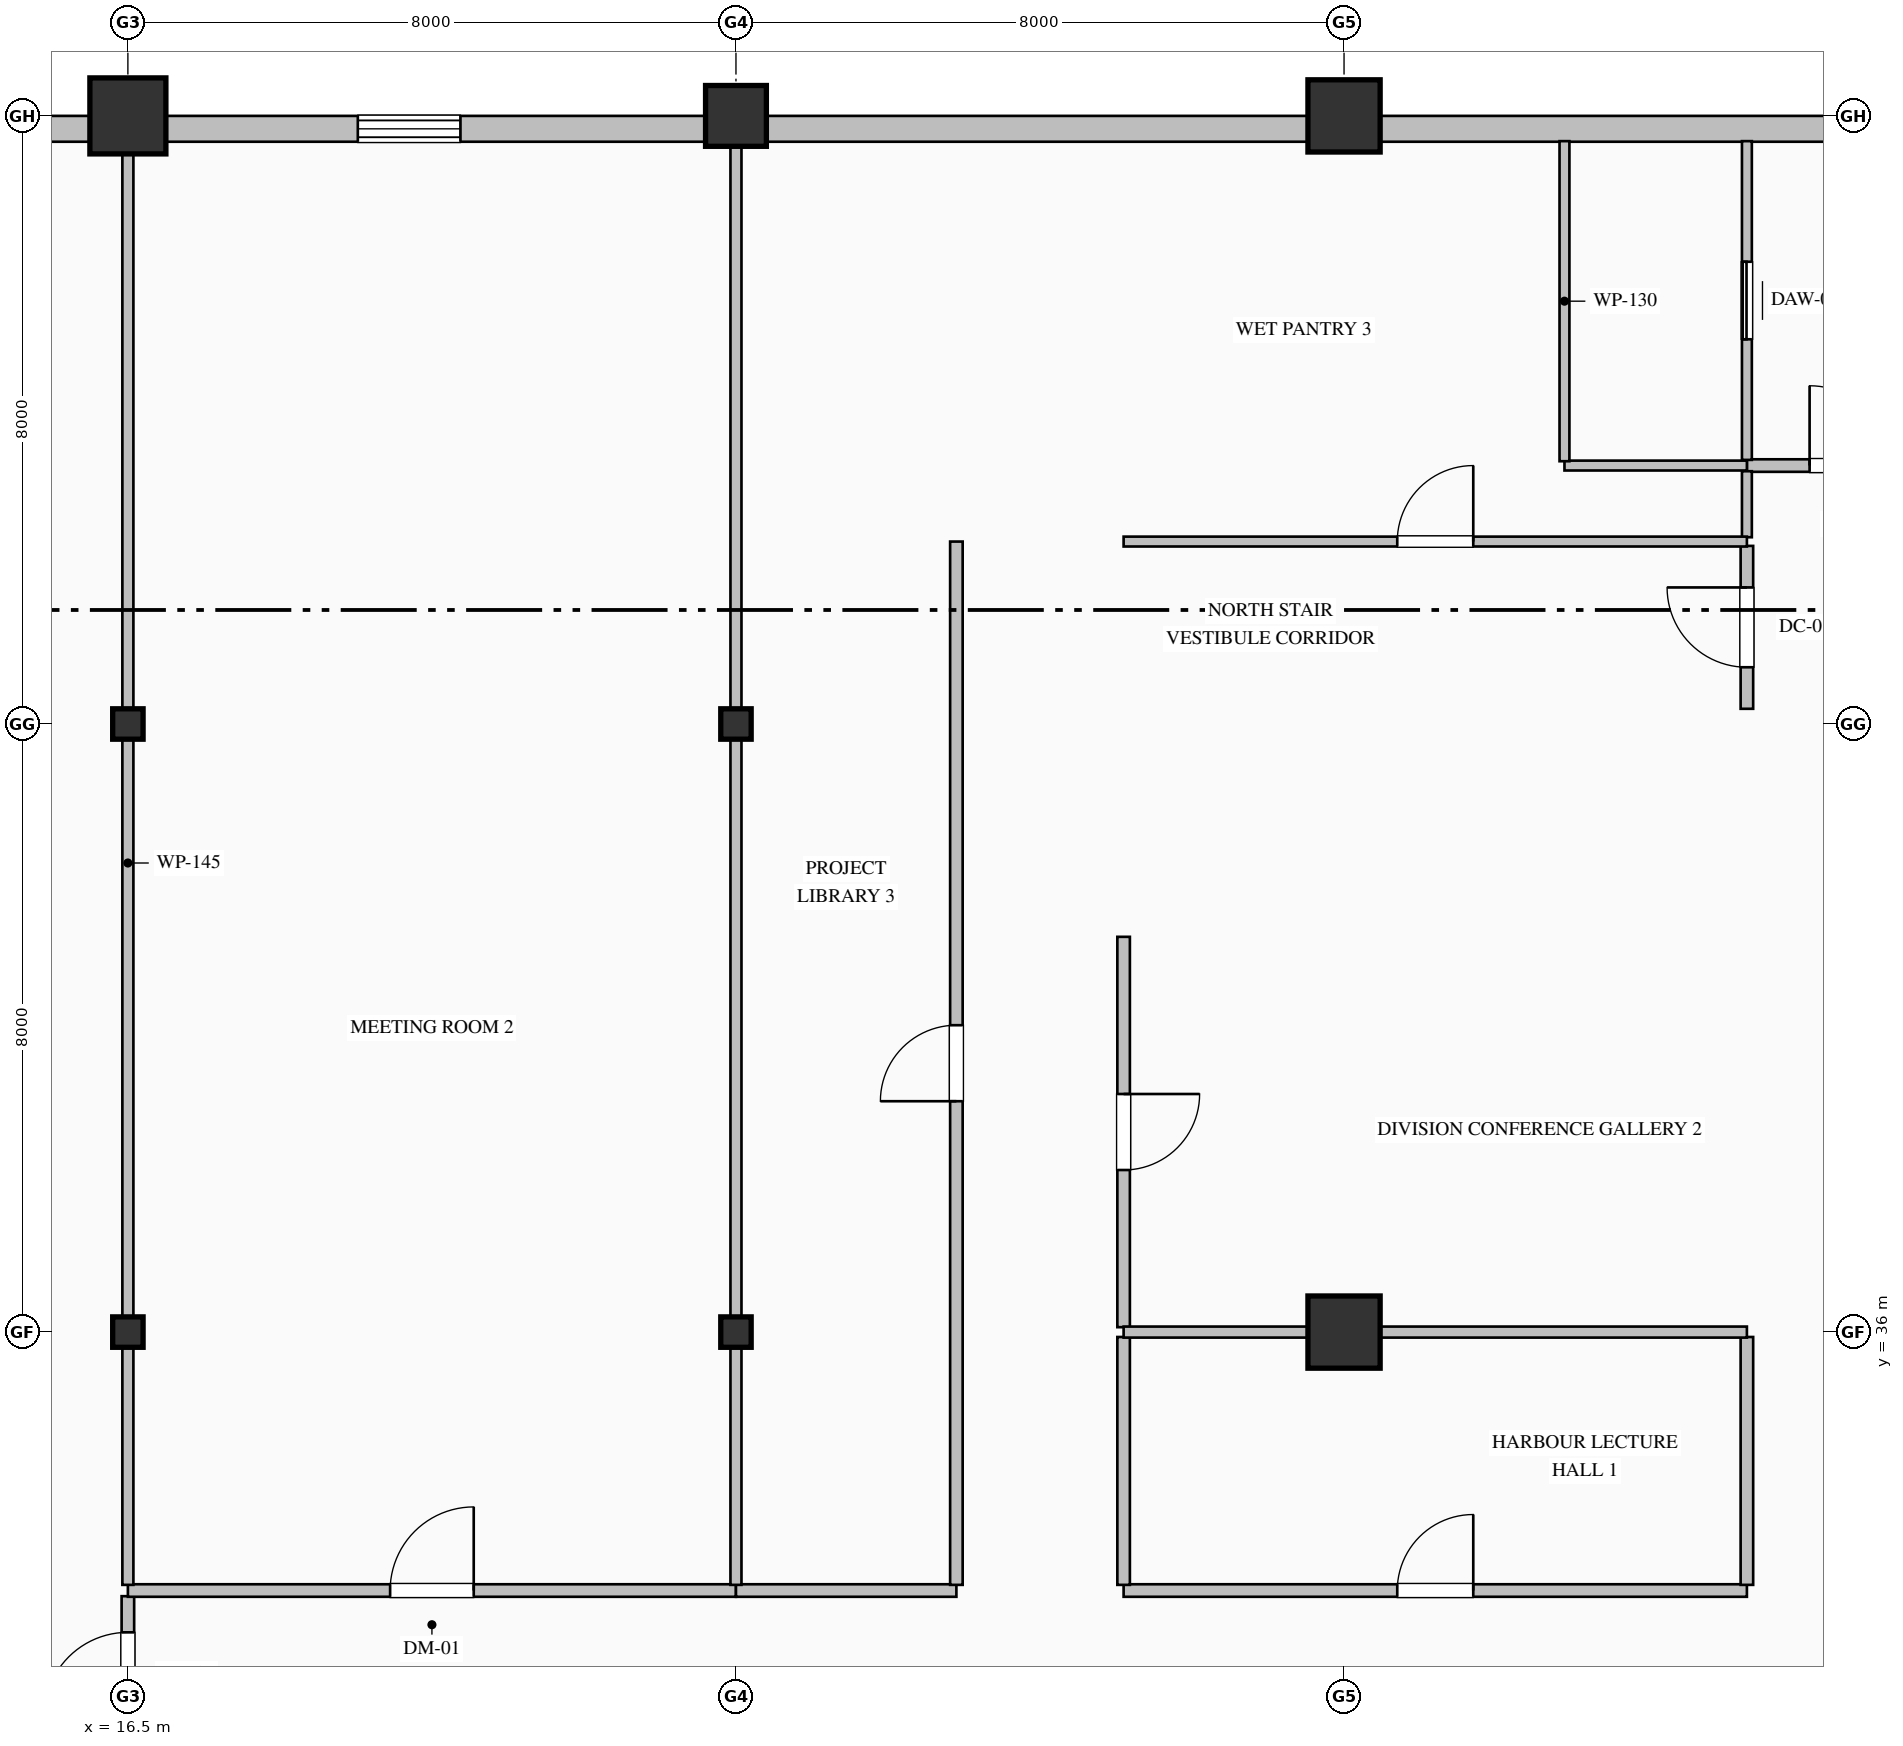
"""IFC4 building model, lengths in metres.
Left out: names, types, materials, properties, quantities, classifications, styles, units other than length and angle.
Written with IfcOpenShell. Run it as: python <this file> out.ifc"""

import sys

from ifc_helpers import new_model, si_unit, direction, frame, frame_2d, origin, origin_2d, place, context, subcontext, project, spatial, rectangle, hollow_rectangle, hollow_circle, i_section, extrude, element, fill, save


model = new_model("IFC4")
c1 = context("Model", 3, precision=1e-05, world=origin(), true_north=direction((0.0, 1.0)))
c2 = subcontext(c1, "Body", "Model", "MODEL_VIEW")
j1 = project(units=[si_unit("LENGTHUNIT", "METRE"), si_unit("PLANEANGLEUNIT", "RADIAN")], contexts=[c1])
p1 = place(None, origin())
s1 = spatial("IfcSite", under=j1, at=p1, CompositionType="ELEMENT")
p2 = place(p1, origin())
s2 = spatial("IfcBuilding", under=s1, at=p2, CompositionType="ELEMENT")
p3 = place(p2, frame((0.0, 0.0, 217.8)))
s3 = spatial("IfcBuildingStorey", under=s2, at=p3, CompositionType="ELEMENT", Elevation=217.8)
for number, where, z_axis, x_axis in (
    (1, (16.5, 36.0, 0.0), (0.0, 0.0, 1.0), (1.0, 0.0, 0.0)),
    (2, (16.5, 44.0, 0.0), (0.0, 0.0, 1.0), (1.0, 0.0, 0.0)),
):
    element("IfcColumn", number, at=place(p3, frame(where, z_axis=z_axis, x_axis=x_axis)), inside=s3, PredefinedType="COLUMN", context=c2, shape_type="SweptSolid", body=[
        extrude(i_section(OverallWidth=0.4, OverallDepth=0.4, WebThickness=0.013, FlangeThickness=0.021, FilletRadius=0.022, at=origin_2d()), origin(), (0.0, 0.0, 1.0), 4.0),
    ])
p4 = place(p3, frame((16.5, 52.0, 0.0), z_axis=(0.0, 0.0, 1.0), x_axis=(1.0, 0.0, 0.0)))
e3 = element("IfcColumn", 3, at=p4, inside=s3, PredefinedType="COLUMN", context=c2, shape_type="SweptSolid", body=[
    extrude(hollow_circle(Radius=0.5, WallThickness=0.036, at=origin_2d()), origin(), (0.0, 0.0, 1.0), 4.0),
])
for number, where, z_axis, x_axis in (
    (4, (24.5, 36.0, 0.0), (0.0, 0.0, 1.0), (1.0, 0.0, 0.0)),
    (5, (24.5, 44.0, 0.0), (0.0, 0.0, 1.0), (1.0, 0.0, 0.0)),
):
    element("IfcColumn", number, at=place(p3, frame(where, z_axis=z_axis, x_axis=x_axis)), inside=s3, PredefinedType="COLUMN", context=c2, shape_type="SweptSolid", body=[
        extrude(i_section(OverallWidth=0.4, OverallDepth=0.4, WebThickness=0.013, FlangeThickness=0.021, FilletRadius=0.022, at=origin_2d()), origin(), (0.0, 0.0, 1.0), 4.0),
    ])
p5 = place(p3, frame((24.5, 52.0, 0.0), z_axis=(0.0, 0.0, 1.0), x_axis=(1.0, 0.0, 0.0)))
e6 = element("IfcColumn", 6, at=p5, inside=s3, PredefinedType="COLUMN", context=c2, shape_type="SweptSolid", body=[
    extrude(hollow_rectangle(XDim=0.8, YDim=0.8, WallThickness=0.032, at=origin_2d()), origin(), (0.0, 0.0, 1.0), 4.0),
])
for number, where, z_axis, x_axis in (
    (7, (32.5, 36.0, 0.0), (0.0, 0.0, 1.0), (1.0, 0.0, 0.0)),
    (8, (32.5, 52.0, 0.0), (0.0, 0.0, 1.0), (1.0, 0.0, 0.0)),
):
    element("IfcColumn", number, at=place(p3, frame(where, z_axis=z_axis, x_axis=x_axis)), inside=s3, PredefinedType="COLUMN", context=c2, shape_type="SweptSolid", body=[
        extrude(hollow_rectangle(XDim=0.95, YDim=0.95, WallThickness=0.036, at=origin_2d()), origin(), (0.0, 0.0, 1.0), 4.0),
    ])
p6 = place(p3, frame((13.0, 51.83, 0.0), z_axis=(0.0, 0.0, 1.0), x_axis=(1.0, 0.0, 0.0)))
e9 = element("IfcWall", 9, at=p6, inside=s3, PredefinedType="SOLIDWALL", context=c2, shape_type="SweptSolid", body=[
    extrude(rectangle(XDim=27.52, YDim=0.34, at=frame_2d((13.76, 0.0))), origin(), (0.0, 0.0, 1.0), 3.325),
])
p7 = place(p6, frame((6.525, 0.0, 0.9)))
e10 = element("IfcOpeningElement", 10, at=p7, cuts=e9, PredefinedType="OPENING", context=c2, shape_type="SweptSolid", body=[
    extrude(rectangle(XDim=1.35, YDim=1.85, at=frame_2d((0.675, 0.925))), frame((0.0, 0.18, 0.0), z_axis=(0.0, -1.0, 0.0), x_axis=(1.0, 0.0, 0.0)), (0.0, 0.0, 1.0), 0.36),
])
p8 = place(p3, frame((37.8, 47.4, 0.0), z_axis=(0.0, 0.0, 1.0), x_axis=(1.0, 0.0, 0.0)))
e11 = element("IfcWall", 11, at=p8, inside=s3, PredefinedType="PARTITIONING", context=c2, shape_type="SweptSolid", body=[
    extrude(rectangle(XDim=2.7, YDim=0.165, at=frame_2d((1.35, 0.0))), origin(), (0.0, 0.0, 1.0), 3.775),
])
p9 = place(p8, frame((0.825, 0.0, 0.0)))
e12 = element("IfcOpeningElement", 12, at=p9, cuts=e11, PredefinedType="OPENING", context=c2, shape_type="SweptSolid", body=[
    extrude(rectangle(XDim=1.05, YDim=2.15, at=frame_2d((0.525, 1.075))), frame((0.0, 0.093, 0.0), z_axis=(0.0, -1.0, 0.0), x_axis=(1.0, 0.0, 0.0)), (0.0, 0.0, 1.0), 0.185),
])
p10 = place(p3, frame((37.8, 44.2, 0.0), z_axis=(0.0, 0.0, 1.0), x_axis=(0.0, 1.0, 0.0)))
e13 = element("IfcWall", 13, at=p10, inside=s3, PredefinedType="PARTITIONING", context=c2, shape_type="SweptSolid", body=[
    extrude(rectangle(XDim=2.143, YDim=0.165, at=frame_2d((1.072, 0.0))), origin(), (0.0, 0.0, 1.0), 3.775),
])
p11 = place(p10, frame((0.546, 0.0, 0.0)))
e14 = element("IfcOpeningElement", 14, at=p11, cuts=e13, PredefinedType="OPENING", context=c2, shape_type="SweptSolid", body=[
    extrude(rectangle(XDim=1.05, YDim=2.15, at=frame_2d((0.525, 1.075))), frame((0.0, 0.093, 0.0), z_axis=(0.0, -1.0, 0.0), x_axis=(1.0, 0.0, 0.0)), (0.0, 0.0, 1.0), 0.185),
])
p12 = place(p3, frame((37.8, 46.457, 0.0), z_axis=(0.0, 0.0, 1.0), x_axis=(0.0, 1.0, 0.0)))
e15 = element("IfcWall", 15, at=p12, inside=s3, PredefinedType="PARTITIONING", context=c2, shape_type="SweptSolid", body=[
    extrude(rectangle(XDim=0.868, YDim=0.13, at=frame_2d((0.434, 0.0))), origin(), (0.0, 0.0, 1.0), 3.775),
])
p13 = place(p3, frame((37.8, 47.475, 0.0), z_axis=(0.0, 0.0, 1.0), x_axis=(0.0, 1.0, 0.0)))
e16 = element("IfcWall", 16, at=p13, inside=s3, PredefinedType="PARTITIONING", context=c2, shape_type="SweptSolid", body=[
    extrude(rectangle(XDim=4.193, YDim=0.13, at=frame_2d((2.097, 0.0))), origin(), (0.0, 0.0, 1.0), 3.775),
])
p14 = place(p13, frame((1.587, 0.0, 0.0)))
e17 = element("IfcOpeningElement", 17, at=p14, cuts=e16, PredefinedType="OPENING", context=c2, shape_type="SweptSolid", body=[
    extrude(rectangle(XDim=1.02, YDim=2.15, at=frame_2d((0.51, 1.075))), frame((0.0, 0.075, 0.0), z_axis=(0.0, -1.0, 0.0), x_axis=(1.0, 0.0, 0.0)), (0.0, 0.0, 1.0), 0.15),
])
p15 = place(p3, frame((37.8, 47.4, 0.0), z_axis=(0.0, 0.0, 1.0), x_axis=(-1.0, 0.0, 0.0)))
e18 = element("IfcWall", 18, at=p15, inside=s3, PredefinedType="PARTITIONING", context=c2, shape_type="SweptSolid", body=[
    extrude(rectangle(XDim=2.4, YDim=0.13, at=frame_2d((1.2, 0.0))), origin(), (0.0, 0.0, 1.0), 3.775),
])
p16 = place(p3, frame((35.4, 47.457, 0.0), z_axis=(0.0, 0.0, 1.0), x_axis=(0.0, 1.0, 0.0)))
e19 = element("IfcWall", 19, at=p16, inside=s3, PredefinedType="PARTITIONING", context=c2, shape_type="SweptSolid", body=[
    extrude(rectangle(XDim=4.211, YDim=0.13, at=frame_2d((2.105, 0.0))), origin(), (0.0, 0.0, 1.0), 3.775),
])
p17 = place(p3, frame((16.5, 30.475, 0.0), z_axis=(0.0, 0.0, 1.0), x_axis=(0.0, 1.0, 0.0)))
e20 = element("IfcWall", 20, at=p17, inside=s3, PredefinedType="PARTITIONING", context=c2, shape_type="SweptSolid", body=[
    extrude(rectangle(XDim=2.051, YDim=0.165, at=frame_2d((1.025, 0.0))), origin(), (0.0, 0.0, 1.0), 3.179),
])
p18 = place(p17, frame((0.476, 0.0, 0.0)))
e21 = element("IfcOpeningElement", 21, at=p18, cuts=e20, PredefinedType="OPENING", context=c2, shape_type="SweptSolid", body=[
    extrude(rectangle(XDim=1.1, YDim=2.2, at=frame_2d((0.55, 1.1))), frame((0.0, 0.093, 0.0), z_axis=(0.0, -1.0, 0.0), x_axis=(1.0, 0.0, 0.0)), (0.0, 0.0, 1.0), 0.185),
])
p19 = place(p3, frame((16.5, 32.6, 0.0), z_axis=(0.0, 0.0, 1.0), x_axis=(1.0, 0.0, 0.0)))
e22 = element("IfcWall", 22, at=p19, inside=s3, PredefinedType="PARTITIONING", context=c2, shape_type="SweptSolid", body=[
    extrude(rectangle(XDim=8.0, YDim=0.165, at=frame_2d((4.0, 0.0))), origin(), (0.0, 0.0, 1.0), 3.775),
])
p20 = place(p19, frame((3.45, 0.0, 0.0)))
e23 = element("IfcOpeningElement", 23, at=p20, cuts=e22, PredefinedType="OPENING", context=c2, shape_type="SweptSolid", body=[
    extrude(rectangle(XDim=1.1, YDim=2.2, at=frame_2d((0.55, 1.1))), frame((0.0, 0.093, 0.0), z_axis=(0.0, -1.0, 0.0), x_axis=(1.0, 0.0, 0.0)), (0.0, 0.0, 1.0), 0.185),
])
p21 = place(p3, frame((24.5, 32.6, 0.0), z_axis=(0.0, 0.0, 1.0), x_axis=(1.0, 0.0, 0.0)))
e24 = element("IfcWall", 24, at=p21, inside=s3, PredefinedType="PARTITIONING", context=c2, shape_type="SweptSolid", body=[
    extrude(rectangle(XDim=2.9, YDim=0.165, at=frame_2d((1.45, 0.0))), origin(), (0.0, 0.0, 1.0), 3.775),
])
p22 = place(p3, frame((29.6, 32.6, 0.0), z_axis=(0.0, 0.0, 1.0), x_axis=(1.0, 0.0, 0.0)))
e25 = element("IfcWall", 25, at=p22, inside=s3, PredefinedType="PARTITIONING", context=c2, shape_type="SweptSolid", body=[
    extrude(rectangle(XDim=8.2, YDim=0.165, at=frame_2d((4.1, 0.0))), origin(), (0.0, 0.0, 1.0), 3.775),
])
p23 = place(p22, frame((3.6, 0.0, 0.0)))
e26 = element("IfcOpeningElement", 26, at=p23, cuts=e25, PredefinedType="OPENING", context=c2, shape_type="SweptSolid", body=[
    extrude(rectangle(XDim=1.0, YDim=2.15, at=frame_2d((0.5, 1.075))), frame((0.0, 0.093, 0.0), z_axis=(0.0, -1.0, 0.0), x_axis=(1.0, 0.0, 0.0)), (0.0, 0.0, 1.0), 0.185),
])
p24 = place(p3, frame((27.4, 32.675, 0.0), z_axis=(0.0, 0.0, 1.0), x_axis=(0.0, 1.0, 0.0)))
e27 = element("IfcWall", 27, at=p24, inside=s3, PredefinedType="PARTITIONING", context=c2, shape_type="SweptSolid", body=[
    extrude(rectangle(XDim=13.725, YDim=0.165, at=frame_2d((6.863, 0.0))), origin(), (0.0, 0.0, 1.0), 3.775),
])
p25 = place(p24, frame((6.363, 0.0, 0.0)))
e28 = element("IfcOpeningElement", 28, at=p25, cuts=e27, PredefinedType="OPENING", context=c2, shape_type="SweptSolid", body=[
    extrude(rectangle(XDim=1.0, YDim=2.15, at=frame_2d((0.5, 1.075))), frame((0.0, 0.093, 0.0), z_axis=(0.0, -1.0, 0.0), x_axis=(1.0, 0.0, 0.0)), (0.0, 0.0, 1.0), 0.185),
])
p26 = place(p3, frame((29.6, 35.936, 0.0), z_axis=(0.0, 0.0, 1.0), x_axis=(0.0, -1.0, 0.0)))
e29 = element("IfcWall", 29, at=p26, inside=s3, PredefinedType="PARTITIONING", context=c2, shape_type="SweptSolid", body=[
    extrude(rectangle(XDim=3.261, YDim=0.165, at=frame_2d((1.63, 0.0))), origin(), (0.0, 0.0, 1.0), 3.775),
])
p27 = place(p3, frame((29.6, 41.2, 0.0), z_axis=(0.0, 0.0, 1.0), x_axis=(0.0, -1.0, 0.0)))
e30 = element("IfcWall", 30, at=p27, inside=s3, PredefinedType="PARTITIONING", context=c2, shape_type="SweptSolid", body=[
    extrude(rectangle(XDim=5.135, YDim=0.165, at=frame_2d((2.568, 0.0))), origin(), (0.0, 0.0, 1.0), 3.775),
])
p28 = place(p27, frame((2.068, 0.0, 0.0)))
e31 = element("IfcOpeningElement", 31, at=p28, cuts=e30, PredefinedType="OPENING", context=c2, shape_type="SweptSolid", body=[
    extrude(rectangle(XDim=1.0, YDim=2.15, at=frame_2d((0.5, 1.075))), frame((0.0, 0.093, 0.0), z_axis=(0.0, -1.0, 0.0), x_axis=(1.0, 0.0, 0.0)), (0.0, 0.0, 1.0), 0.185),
])
p29 = place(p3, frame((29.6, 46.4, 0.0), z_axis=(0.0, 0.0, 1.0), x_axis=(1.0, 0.0, 0.0)))
e32 = element("IfcWall", 32, at=p29, inside=s3, PredefinedType="PARTITIONING", context=c2, shape_type="SweptSolid", body=[
    extrude(rectangle(XDim=8.2, YDim=0.13, at=frame_2d((4.1, 0.0))), origin(), (0.0, 0.0, 1.0), 3.775),
])
p30 = place(p29, frame((3.6, 0.0, 0.0)))
e33 = element("IfcOpeningElement", 33, at=p30, cuts=e32, PredefinedType="OPENING", context=c2, shape_type="SweptSolid", body=[
    extrude(rectangle(XDim=1.0, YDim=2.15, at=frame_2d((0.5, 1.075))), frame((0.0, 0.075, 0.0), z_axis=(0.0, -1.0, 0.0), x_axis=(1.0, 0.0, 0.0)), (0.0, 0.0, 1.0), 0.15),
])
p31 = place(p3, frame((37.8, 32.675, 0.0), z_axis=(0.0, 0.0, 1.0), x_axis=(0.0, 1.0, 0.0)))
e34 = element("IfcWall", 34, at=p31, inside=s3, PredefinedType="PARTITIONING", context=c2, shape_type="SweptSolid", body=[
    extrude(rectangle(XDim=3.261, YDim=0.165, at=frame_2d((1.63, 0.0))), origin(), (0.0, 0.0, 1.0), 3.775),
])
for number, where, z_axis, x_axis in (
    (35, (16.5, 51.668, 0.0), (0.0, 0.0, 1.0), (0.0, -1.0, 0.0)),
    (36, (24.5, 51.668, 0.0), (0.0, 0.0, 1.0), (0.0, -1.0, 0.0)),
):
    element("IfcWall", number, at=place(p3, frame(where, z_axis=z_axis, x_axis=x_axis)), inside=s3, PredefinedType="PARTITIONING", context=c2, shape_type="SweptSolid", body=[
        extrude(rectangle(XDim=18.993, YDim=0.145, at=frame_2d((9.497, 0.0))), origin(), (0.0, 0.0, 1.0), 3.179),
    ])
p32 = place(p3, frame((29.6, 36.0, 0.0), z_axis=(0.0, 0.0, 1.0), x_axis=(1.0, 0.0, 0.0)))
e37 = element("IfcWall", 37, at=p32, inside=s3, PredefinedType="PARTITIONING", context=c2, shape_type="SweptSolid", body=[
    extrude(rectangle(XDim=8.2, YDim=0.145, at=frame_2d((4.1, 0.0))), origin(), (0.0, 0.0, 1.0), 3.179),
])
p33 = place(p7, origin())
e38 = element("IfcWindow", 38, at=p33, inside=s3, PartitioningType="DOUBLE_PANEL_VERTICAL", PredefinedType="WINDOW", context=c2, shape_type="SweptSolid", body=[
    extrude(rectangle(XDim=1.35, YDim=1.85, at=frame_2d((0.675, 0.925))), frame((0.0, 0.15, 0.0), z_axis=(0.0, -1.0, 0.0), x_axis=(1.0, 0.0, 0.0)), (0.0, 0.0, 1.0), 0.06),
])
fill(e10, e38)
p34 = place(p9, origin())
e39 = element("IfcDoor", 39, at=p34, inside=s3, OperationType="SINGLE_SWING_LEFT", PredefinedType="DOOR", context=c2, shape_type="SweptSolid", body=[
    extrude(rectangle(XDim=1.05, YDim=2.15, at=frame_2d((0.525, 1.075))), frame((0.0, 0.025, 0.0), z_axis=(0.0, -1.0, 0.0), x_axis=(1.0, 0.0, 0.0)), (0.0, 0.0, 1.0), 0.05),
])
fill(e12, e39)
p35 = place(p11, origin())
e40 = element("IfcDoor", 40, at=p35, inside=s3, OperationType="SINGLE_SWING_RIGHT", PredefinedType="DOOR", context=c2, shape_type="SweptSolid", body=[
    extrude(rectangle(XDim=1.05, YDim=2.15, at=frame_2d((0.525, 1.075))), frame((0.0, 0.025, 0.0), z_axis=(0.0, -1.0, 0.0), x_axis=(1.0, 0.0, 0.0)), (0.0, 0.0, 1.0), 0.05),
])
fill(e14, e40)
p36 = place(p14, origin())
e41 = element("IfcDoor", 41, at=p36, inside=s3, OperationType="SLIDING_TO_LEFT", PredefinedType="DOOR", context=c2, shape_type="SweptSolid", body=[
    extrude(rectangle(XDim=1.02, YDim=2.15, at=frame_2d((0.51, 1.075))), frame((0.0, 0.025, 0.0), z_axis=(0.0, -1.0, 0.0), x_axis=(1.0, 0.0, 0.0)), (0.0, 0.0, 1.0), 0.05),
])
fill(e17, e41)
p37 = place(p18, origin())
e42 = element("IfcDoor", 42, at=p37, inside=s3, OperationType="SINGLE_SWING_LEFT", PredefinedType="DOOR", context=c2, shape_type="SweptSolid", body=[
    extrude(rectangle(XDim=1.1, YDim=2.2, at=frame_2d((0.55, 1.1))), frame((0.0, 0.025, 0.0), z_axis=(0.0, -1.0, 0.0), x_axis=(1.0, 0.0, 0.0)), (0.0, 0.0, 1.0), 0.05),
])
fill(e21, e42)
p38 = place(p20, origin())
e43 = element("IfcDoor", 43, at=p38, inside=s3, OperationType="SINGLE_SWING_RIGHT", PredefinedType="DOOR", context=c2, shape_type="SweptSolid", body=[
    extrude(rectangle(XDim=1.1, YDim=2.2, at=frame_2d((0.55, 1.1))), frame((0.0, 0.025, 0.0), z_axis=(0.0, -1.0, 0.0), x_axis=(1.0, 0.0, 0.0)), (0.0, 0.0, 1.0), 0.05),
])
fill(e23, e43)
p39 = place(p25, origin())
e44 = element("IfcDoor", 44, at=p39, inside=s3, OperationType="SINGLE_SWING_LEFT", PredefinedType="DOOR", context=c2, shape_type="SweptSolid", body=[
    extrude(rectangle(XDim=1.0, YDim=2.15, at=frame_2d((0.5, 1.075))), frame((0.0, 0.025, 0.0), z_axis=(0.0, -1.0, 0.0), x_axis=(1.0, 0.0, 0.0)), (0.0, 0.0, 1.0), 0.05),
])
fill(e28, e44)
p40 = place(p23, origin())
e45 = element("IfcDoor", 45, at=p40, inside=s3, OperationType="SINGLE_SWING_RIGHT", PredefinedType="DOOR", context=c2, shape_type="SweptSolid", body=[
    extrude(rectangle(XDim=1.0, YDim=2.15, at=frame_2d((0.5, 1.075))), frame((0.0, 0.025, 0.0), z_axis=(0.0, -1.0, 0.0), x_axis=(1.0, 0.0, 0.0)), (0.0, 0.0, 1.0), 0.05),
])
fill(e26, e45)
p41 = place(p28, origin())
e46 = element("IfcDoor", 46, at=p41, inside=s3, OperationType="SINGLE_SWING_LEFT", PredefinedType="DOOR", context=c2, shape_type="SweptSolid", body=[
    extrude(rectangle(XDim=1.0, YDim=2.15, at=frame_2d((0.5, 1.075))), frame((0.0, 0.025, 0.0), z_axis=(0.0, -1.0, 0.0), x_axis=(1.0, 0.0, 0.0)), (0.0, 0.0, 1.0), 0.05),
])
fill(e31, e46)
p42 = place(p30, origin())
e47 = element("IfcDoor", 47, at=p42, inside=s3, OperationType="SINGLE_SWING_RIGHT", PredefinedType="DOOR", context=c2, shape_type="SweptSolid", body=[
    extrude(rectangle(XDim=1.0, YDim=2.15, at=frame_2d((0.5, 1.075))), frame((0.0, 0.025, 0.0), z_axis=(0.0, -1.0, 0.0), x_axis=(1.0, 0.0, 0.0)), (0.0, 0.0, 1.0), 0.05),
])
fill(e33, e47)
save(model, sys.argv[1])
